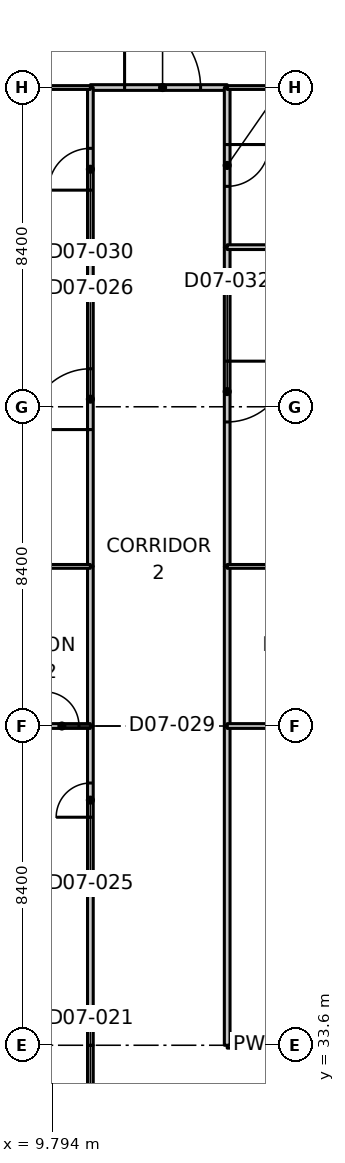
"""IFC4 building model, lengths in metres.
Left out: names, types, materials, properties, quantities, classifications, styles, units other than length and angle.
Written with IfcOpenShell. Run it as: python <this file> out.ifc"""

import sys

from ifc_helpers import new_model, si_unit, direction, frame, frame_2d, origin, place, context, subcontext, project, spatial, polyline, rectangle, outline, extrude, element, fill, save


model = new_model("IFC4")
c1 = context("Model", 3, precision=1e-05, world=origin(), true_north=direction((0.0, 1.0)))
c2 = subcontext(c1, "Body", "Model", "MODEL_VIEW")
j1 = project(units=[si_unit("LENGTHUNIT", "METRE"), si_unit("PLANEANGLEUNIT", "RADIAN")], contexts=[c1])
p1 = place(None, origin())
s1 = spatial("IfcSite", under=j1, at=p1, CompositionType="ELEMENT")
p2 = place(p1, origin())
s2 = spatial("IfcBuilding", under=s1, at=p2, CompositionType="ELEMENT")
p3 = place(p2, frame((0.0, 0.0, 40.1)))
s3 = spatial("IfcBuildingStorey", under=s2, at=p3, CompositionType="ELEMENT", Elevation=40.1)
p4 = place(p3, frame((10.8, 29.4, 0.0), z_axis=(0.0, 0.0, 1.0), x_axis=(0.0, 1.0, 0.0)))
e1 = element("IfcWall", 1, at=p4, inside=s3, PredefinedType="PARTITIONING", context=c2, shape_type="SweptSolid", body=[
    extrude(rectangle(XDim=4.2, YDim=0.15, at=frame_2d((2.1, 0.0))), origin(), (0.0, 0.0, 1.0), 3.33),
])
p5 = place(p4, frame((1.2, 0.0, 0.0)))
e2 = element("IfcOpeningElement", 2, at=p5, cuts=e1, PredefinedType="OPENING", context=c2, shape_type="SweptSolid", body=[
    extrude(rectangle(XDim=1.6, YDim=2.1, at=frame_2d((0.8, 1.05))), frame((0.0, 0.085, 0.0), z_axis=(0.0, -1.0, 0.0), x_axis=(1.0, 0.0, 0.0)), (0.0, 0.0, 1.0), 0.17),
])
p6 = place(p3, frame((14.4, 33.6, 0.0), z_axis=(0.0, 0.0, 1.0), x_axis=(1.0, 0.0, 0.0)))
e3 = element("IfcWall", 3, at=p6, inside=s3, PredefinedType="PARTITIONING", context=c2, shape_type="SweptSolid", body=[
    extrude(rectangle(XDim=1.5, YDim=0.15, at=frame_2d((0.75, 0.0))), origin(), (0.0, 0.0, 1.0), 3.33),
])
p7 = place(p3, frame((10.8, 58.8, 0.0), z_axis=(0.0, 0.0, 1.0), x_axis=(1.0, 0.0, 0.0)))
e4 = element("IfcWall", 4, at=p7, inside=s3, PredefinedType="PARTITIONING", context=c2, shape_type="SweptSolid", body=[
    extrude(rectangle(XDim=3.6, YDim=0.15, at=frame_2d((1.8, 0.0))), origin(), (0.0, 0.0, 1.0), 3.33),
])
p8 = place(p7, frame((0.9, 0.0, 0.0)))
e5 = element("IfcOpeningElement", 5, at=p8, cuts=e4, PredefinedType="OPENING", context=c2, shape_type="SweptSolid", body=[
    extrude(rectangle(XDim=2.0, YDim=2.4, at=frame_2d((1.0, 1.2))), frame((0.0, 0.085, 0.0), z_axis=(0.0, -1.0, 0.0), x_axis=(1.0, 0.0, 0.0)), (0.0, 0.0, 1.0), 0.17),
])
p9 = place(p3, frame((10.8, 33.6, 0.0), z_axis=(0.0, 0.0, 1.0), x_axis=(0.0, 1.0, 0.0)))
e6 = element("IfcWall", 6, at=p9, inside=s3, PredefinedType="PARTITIONING", context=c2, shape_type="SweptSolid", body=[
    extrude(rectangle(XDim=4.2, YDim=0.15, at=frame_2d((2.1, 0.0))), origin(), (0.0, 0.0, 1.0), 3.33),
])
p10 = place(p3, frame((10.8, 37.8, 0.0), z_axis=(0.0, 0.0, 1.0), x_axis=(0.0, 1.0, 0.0)))
e7 = element("IfcWall", 7, at=p10, inside=s3, PredefinedType="PARTITIONING", context=c2, shape_type="SweptSolid", body=[
    extrude(rectangle(XDim=4.2, YDim=0.15, at=frame_2d((2.1, 0.0))), origin(), (0.0, 0.0, 1.0), 3.33),
])
p11 = place(p10, frame((1.8, 0.0, 0.0)))
e8 = element("IfcOpeningElement", 8, at=p11, cuts=e7, PredefinedType="OPENING", context=c2, shape_type="SweptSolid", body=[
    extrude(rectangle(XDim=0.9, YDim=2.1, at=frame_2d((0.45, 1.05))), frame((0.0, 0.085, 0.0), z_axis=(0.0, -1.0, 0.0), x_axis=(1.0, 0.0, 0.0)), (0.0, 0.0, 1.0), 0.17),
])
p12 = place(p3, frame((10.8, 46.2, 0.0), z_axis=(0.0, 0.0, 1.0), x_axis=(0.0, 1.0, 0.0)))
e9 = element("IfcWall", 9, at=p12, inside=s3, PredefinedType="PARTITIONING", context=c2, shape_type="SweptSolid", body=[
    extrude(rectangle(XDim=8.4, YDim=0.15, at=frame_2d((4.2, 0.0))), origin(), (0.0, 0.0, 1.0), 3.33),
])
p13 = place(p12, frame((3.6, 0.0, 0.0)))
e10 = element("IfcOpeningElement", 10, at=p13, cuts=e9, PredefinedType="OPENING", context=c2, shape_type="SweptSolid", body=[
    extrude(rectangle(XDim=1.6, YDim=2.1, at=frame_2d((0.8, 1.05))), frame((0.0, 0.085, 0.0), z_axis=(0.0, -1.0, 0.0), x_axis=(1.0, 0.0, 0.0)), (0.0, 0.0, 1.0), 0.17),
])
p14 = place(p3, frame((10.8, 42.0, 0.0), z_axis=(0.0, 0.0, 1.0), x_axis=(0.0, 1.0, 0.0)))
e11 = element("IfcWall", 11, at=p14, inside=s3, PredefinedType="PARTITIONING", context=c2, shape_type="SweptSolid", body=[
    extrude(rectangle(XDim=4.2, YDim=0.15, at=frame_2d((2.1, 0.0))), origin(), (0.0, 0.0, 1.0), 3.33),
])
p15 = place(p3, frame((10.8, 54.6, 0.0), z_axis=(0.0, 0.0, 1.0), x_axis=(0.0, 1.0, 0.0)))
e12 = element("IfcWall", 12, at=p15, inside=s3, PredefinedType="PARTITIONING", context=c2, shape_type="SweptSolid", body=[
    extrude(rectangle(XDim=4.2, YDim=0.15, at=frame_2d((2.1, 0.0))), origin(), (0.0, 0.0, 1.0), 3.33),
])
p16 = place(p15, frame((1.5, 0.0, 0.0)))
e13 = element("IfcOpeningElement", 13, at=p16, cuts=e12, PredefinedType="OPENING", context=c2, shape_type="SweptSolid", body=[
    extrude(rectangle(XDim=1.1, YDim=2.1, at=frame_2d((0.55, 1.05))), frame((0.0, 0.085, 0.0), z_axis=(0.0, -1.0, 0.0), x_axis=(1.0, 0.0, 0.0)), (0.0, 0.0, 1.0), 0.17),
])
p17 = place(p3, frame((14.4, 42.0, 0.0), z_axis=(0.0, 0.0, 1.0), x_axis=(0.0, -1.0, 0.0)))
e14 = element("IfcWall", 14, at=p17, inside=s3, PredefinedType="PARTITIONING", context=c2, shape_type="SweptSolid", body=[
    extrude(rectangle(XDim=8.4, YDim=0.15, at=frame_2d((4.2, 0.0))), origin(), (0.0, 0.0, 1.0), 3.33),
])
p18 = place(p3, frame((14.4, 54.6, 0.0), z_axis=(0.0, 0.0, 1.0), x_axis=(0.0, -1.0, 0.0)))
e15 = element("IfcWall", 15, at=p18, inside=s3, PredefinedType="PARTITIONING", context=c2, shape_type="SweptSolid", body=[
    extrude(rectangle(XDim=8.4, YDim=0.15, at=frame_2d((4.2, 0.0))), origin(), (0.0, 0.0, 1.0), 3.33),
])
p19 = place(p18, frame((3.0, 0.0, 0.0)))
e16 = element("IfcOpeningElement", 16, at=p19, cuts=e15, PredefinedType="OPENING", context=c2, shape_type="SweptSolid", body=[
    extrude(rectangle(XDim=1.6, YDim=2.1, at=frame_2d((0.8, 1.05))), frame((0.0, 0.085, 0.0), z_axis=(0.0, -1.0, 0.0), x_axis=(1.0, 0.0, 0.0)), (0.0, 0.0, 1.0), 0.17),
])
p20 = place(p3, frame((14.4, 46.2, 0.0), z_axis=(0.0, 0.0, 1.0), x_axis=(0.0, -1.0, 0.0)))
e17 = element("IfcWall", 17, at=p20, inside=s3, PredefinedType="PARTITIONING", context=c2, shape_type="SweptSolid", body=[
    extrude(rectangle(XDim=4.2, YDim=0.15, at=frame_2d((2.1, 0.0))), origin(), (0.0, 0.0, 1.0), 3.33),
])
p21 = place(p3, frame((14.4, 58.8, 0.0), z_axis=(0.0, 0.0, 1.0), x_axis=(0.0, -1.0, 0.0)))
e18 = element("IfcWall", 18, at=p21, inside=s3, PredefinedType="PARTITIONING", context=c2, shape_type="SweptSolid", body=[
    extrude(rectangle(XDim=4.2, YDim=0.15, at=frame_2d((2.1, 0.0))), origin(), (0.0, 0.0, 1.0), 3.33),
])
p22 = place(p21, frame((1.5, 0.0, 0.0)))
e19 = element("IfcOpeningElement", 19, at=p22, cuts=e18, PredefinedType="OPENING", context=c2, shape_type="SweptSolid", body=[
    extrude(rectangle(XDim=1.1, YDim=2.1, at=frame_2d((0.55, 1.05))), frame((0.0, 0.085, 0.0), z_axis=(0.0, -1.0, 0.0), x_axis=(1.0, 0.0, 0.0)), (0.0, 0.0, 1.0), 0.17),
])
p23 = place(p3, frame((10.8, 58.8, 0.0), z_axis=(0.0, 0.0, 1.0), x_axis=(-1.0, 0.0, 0.0)))
e20 = element("IfcWall", 20, at=p23, inside=s3, PredefinedType="PARTITIONING", context=c2, shape_type="SweptSolid", body=[
    extrude(rectangle(XDim=1.68, YDim=0.1, at=frame_2d((0.84, 0.0))), origin(), (0.0, 0.0, 1.0), 3.33),
])
p24 = place(p3, frame((16.08, 58.8, 0.0), z_axis=(0.0, 0.0, 1.0), x_axis=(-1.0, 0.0, 0.0)))
e21 = element("IfcWall", 21, at=p24, inside=s3, PredefinedType="PARTITIONING", context=c2, shape_type="SweptSolid", body=[
    extrude(rectangle(XDim=1.68, YDim=0.1, at=frame_2d((0.84, 0.0))), origin(), (0.0, 0.0, 1.0), 3.33),
])
p25 = place(p3, frame((-1.47, 37.8, 0.0), z_axis=(0.0, 0.0, 1.0), x_axis=(1.0, 0.0, 0.0)))
e22 = element("IfcWall", 22, at=p25, inside=s3, PredefinedType="PARTITIONING", context=c2, shape_type="SweptSolid", body=[
    extrude(outline(polyline([(0.0, 0.0), (12.27, 0.0), (12.27, 3.33), (1.92, 3.33), (1.918, 2.98), (1.022, 2.98), (1.02, 3.33), (0.37, 3.33), (0.0, 3.33), (0.0, 0.0)])), frame((0.0, 0.062, 0.0), z_axis=(0.0, -1.0, 0.0), x_axis=(1.0, 0.0, 0.0)), (0.0, 0.0, 1.0), 0.125),
])
p26 = place(p3, frame((6.6, 42.0, 0.0), z_axis=(0.0, 0.0, 1.0), x_axis=(1.0, 0.0, 0.0)))
e23 = element("IfcWall", 23, at=p26, inside=s3, PredefinedType="PARTITIONING", context=c2, shape_type="SweptSolid", body=[
    extrude(rectangle(XDim=4.2, YDim=0.125, at=frame_2d((2.1, 0.0))), origin(), (0.0, 0.0, 1.0), 3.33),
])
p27 = place(p26, frame((3.0, 0.0, 0.0)))
e24 = element("IfcOpeningElement", 24, at=p27, cuts=e23, PredefinedType="OPENING", context=c2, shape_type="SweptSolid", body=[
    extrude(rectangle(XDim=0.9, YDim=2.1, at=frame_2d((0.45, 1.05))), frame((0.0, 0.073, 0.0), z_axis=(0.0, -1.0, 0.0), x_axis=(1.0, 0.0, 0.0)), (0.0, 0.0, 1.0), 0.145),
])
p28 = place(p3, frame((10.8, 46.2, 0.0), z_axis=(0.0, 0.0, 1.0), x_axis=(-1.0, 0.0, 0.0)))
e25 = element("IfcWall", 25, at=p28, inside=s3, PredefinedType="PARTITIONING", context=c2, shape_type="SweptSolid", body=[
    extrude(rectangle(XDim=4.2, YDim=0.1, at=frame_2d((2.1, 0.0))), origin(), (0.0, 0.0, 1.0), 3.33),
])
p29 = place(p3, frame((-1.365, 54.6, 0.0), z_axis=(0.0, 0.0, 1.0), x_axis=(1.0, 0.0, 0.0)))
e26 = element("IfcWall", 26, at=p29, inside=s3, PredefinedType="PARTITIONING", context=c2, shape_type="SweptSolid", body=[
    extrude(outline(polyline([(0.0, 0.0), (12.165, 0.0), (12.165, 3.33), (1.815, 3.33), (1.813, 2.98), (0.917, 2.98), (0.915, 3.33), (0.265, 3.33), (0.0, 3.33), (0.0, 0.0)])), frame((0.0, 0.062, 0.0), z_axis=(0.0, -1.0, 0.0), x_axis=(1.0, 0.0, 0.0)), (0.0, 0.0, 1.0), 0.125),
])
p30 = place(p3, frame((14.4, 42.0, 0.0), z_axis=(0.0, 0.0, 1.0), x_axis=(1.0, 0.0, 0.0)))
e27 = element("IfcWall", 27, at=p30, inside=s3, PredefinedType="PARTITIONING", context=c2, shape_type="SweptSolid", body=[
    extrude(rectangle(XDim=6.0, YDim=0.125, at=frame_2d((3.0, 0.0))), origin(), (0.0, 0.0, 1.0), 3.33),
])
p31 = place(p3, frame((20.4, 46.2, 0.0), z_axis=(0.0, 0.0, 1.0), x_axis=(-1.0, 0.0, 0.0)))
e28 = element("IfcWall", 28, at=p31, inside=s3, PredefinedType="PARTITIONING", context=c2, shape_type="SweptSolid", body=[
    extrude(rectangle(XDim=6.0, YDim=0.1, at=frame_2d((3.0, 0.0))), origin(), (0.0, 0.0, 1.0), 3.33),
])
p32 = place(p31, frame((1.5, 0.0, 0.0)))
e29 = element("IfcOpeningElement", 29, at=p32, cuts=e28, PredefinedType="OPENING", context=c2, shape_type="SweptSolid", body=[
    extrude(rectangle(XDim=1.0, YDim=2.1, at=frame_2d((0.5, 1.05))), frame((0.0, 0.06, 0.0), z_axis=(0.0, -1.0, 0.0), x_axis=(1.0, 0.0, 0.0)), (0.0, 0.0, 1.0), 0.12),
])
p33 = place(p3, frame((14.4, 54.6, 0.0), z_axis=(0.0, 0.0, 1.0), x_axis=(1.0, 0.0, 0.0)))
e30 = element("IfcWall", 30, at=p33, inside=s3, PredefinedType="PARTITIONING", context=c2, shape_type="SweptSolid", body=[
    extrude(outline(polyline([(0.0, 0.0), (12.165, 0.0), (12.165, 3.33), (11.9, 3.33), (11.25, 3.33), (11.248, 2.98), (10.352, 2.98), (10.35, 3.33), (0.0, 3.33), (0.0, 0.0)])), frame((0.0, 0.062, 0.0), z_axis=(0.0, -1.0, 0.0), x_axis=(1.0, 0.0, 0.0)), (0.0, 0.0, 1.0), 0.125),
])
p34 = place(p8, origin())
e31 = element("IfcDoor", 31, at=p34, inside=s3, OperationType="DOUBLE_DOOR_SINGLE_SWING", PredefinedType="DOOR", context=c2, shape_type="SweptSolid", body=[
    extrude(rectangle(XDim=2.0, YDim=2.4, at=frame_2d((1.0, 1.2))), frame((0.0, 0.025, 0.0), z_axis=(0.0, -1.0, 0.0), x_axis=(1.0, 0.0, 0.0)), (0.0, 0.0, 1.0), 0.05),
])
fill(e5, e31)
p35 = place(p11, origin())
e32 = element("IfcDoor", 32, at=p35, inside=s3, OperationType="SINGLE_SWING_LEFT", PredefinedType="DOOR", context=c2, shape_type="SweptSolid", body=[
    extrude(rectangle(XDim=0.9, YDim=2.1, at=frame_2d((0.45, 1.05))), frame((0.0, 0.025, 0.0), z_axis=(0.0, -1.0, 0.0), x_axis=(1.0, 0.0, 0.0)), (0.0, 0.0, 1.0), 0.05),
])
fill(e8, e32)
p36 = place(p13, origin())
e33 = element("IfcDoor", 33, at=p36, inside=s3, OperationType="DOUBLE_DOOR_SINGLE_SWING", PredefinedType="DOOR", context=c2, shape_type="SweptSolid", body=[
    extrude(rectangle(XDim=1.6, YDim=2.1, at=frame_2d((0.8, 1.05))), frame((0.0, 0.025, 0.0), z_axis=(0.0, -1.0, 0.0), x_axis=(1.0, 0.0, 0.0)), (0.0, 0.0, 1.0), 0.05),
])
fill(e10, e33)
p37 = place(p27, origin())
e34 = element("IfcDoor", 34, at=p37, inside=s3, OperationType="SINGLE_SWING_RIGHT", PredefinedType="DOOR", context=c2, shape_type="SweptSolid", body=[
    extrude(rectangle(XDim=0.9, YDim=2.1, at=frame_2d((0.45, 1.05))), frame((0.0, 0.025, 0.0), z_axis=(0.0, -1.0, 0.0), x_axis=(1.0, 0.0, 0.0)), (0.0, 0.0, 1.0), 0.05),
])
fill(e24, e34)
p38 = place(p16, origin())
e35 = element("IfcDoor", 35, at=p38, inside=s3, OperationType="SINGLE_SWING_LEFT", PredefinedType="DOOR", context=c2, shape_type="SweptSolid", body=[
    extrude(rectangle(XDim=1.1, YDim=2.1, at=frame_2d((0.55, 1.05))), frame((0.0, 0.025, 0.0), z_axis=(0.0, -1.0, 0.0), x_axis=(1.0, 0.0, 0.0)), (0.0, 0.0, 1.0), 0.05),
])
fill(e13, e35)
p39 = place(p19, origin())
e36 = element("IfcDoor", 36, at=p39, inside=s3, OperationType="DOUBLE_DOOR_SINGLE_SWING", PredefinedType="DOOR", context=c2, shape_type="SweptSolid", body=[
    extrude(rectangle(XDim=1.6, YDim=2.1, at=frame_2d((0.8, 1.05))), frame((0.0, 0.025, 0.0), z_axis=(0.0, -1.0, 0.0), x_axis=(1.0, 0.0, 0.0)), (0.0, 0.0, 1.0), 0.05),
])
fill(e16, e36)
p40 = place(p22, origin())
e37 = element("IfcDoor", 37, at=p40, inside=s3, OperationType="SINGLE_SWING_LEFT", PredefinedType="DOOR", context=c2, shape_type="SweptSolid", body=[
    extrude(rectangle(XDim=1.1, YDim=2.1, at=frame_2d((0.55, 1.05))), frame((0.0, 0.025, 0.0), z_axis=(0.0, -1.0, 0.0), x_axis=(1.0, 0.0, 0.0)), (0.0, 0.0, 1.0), 0.05),
])
fill(e19, e37)
save(model, sys.argv[1])
